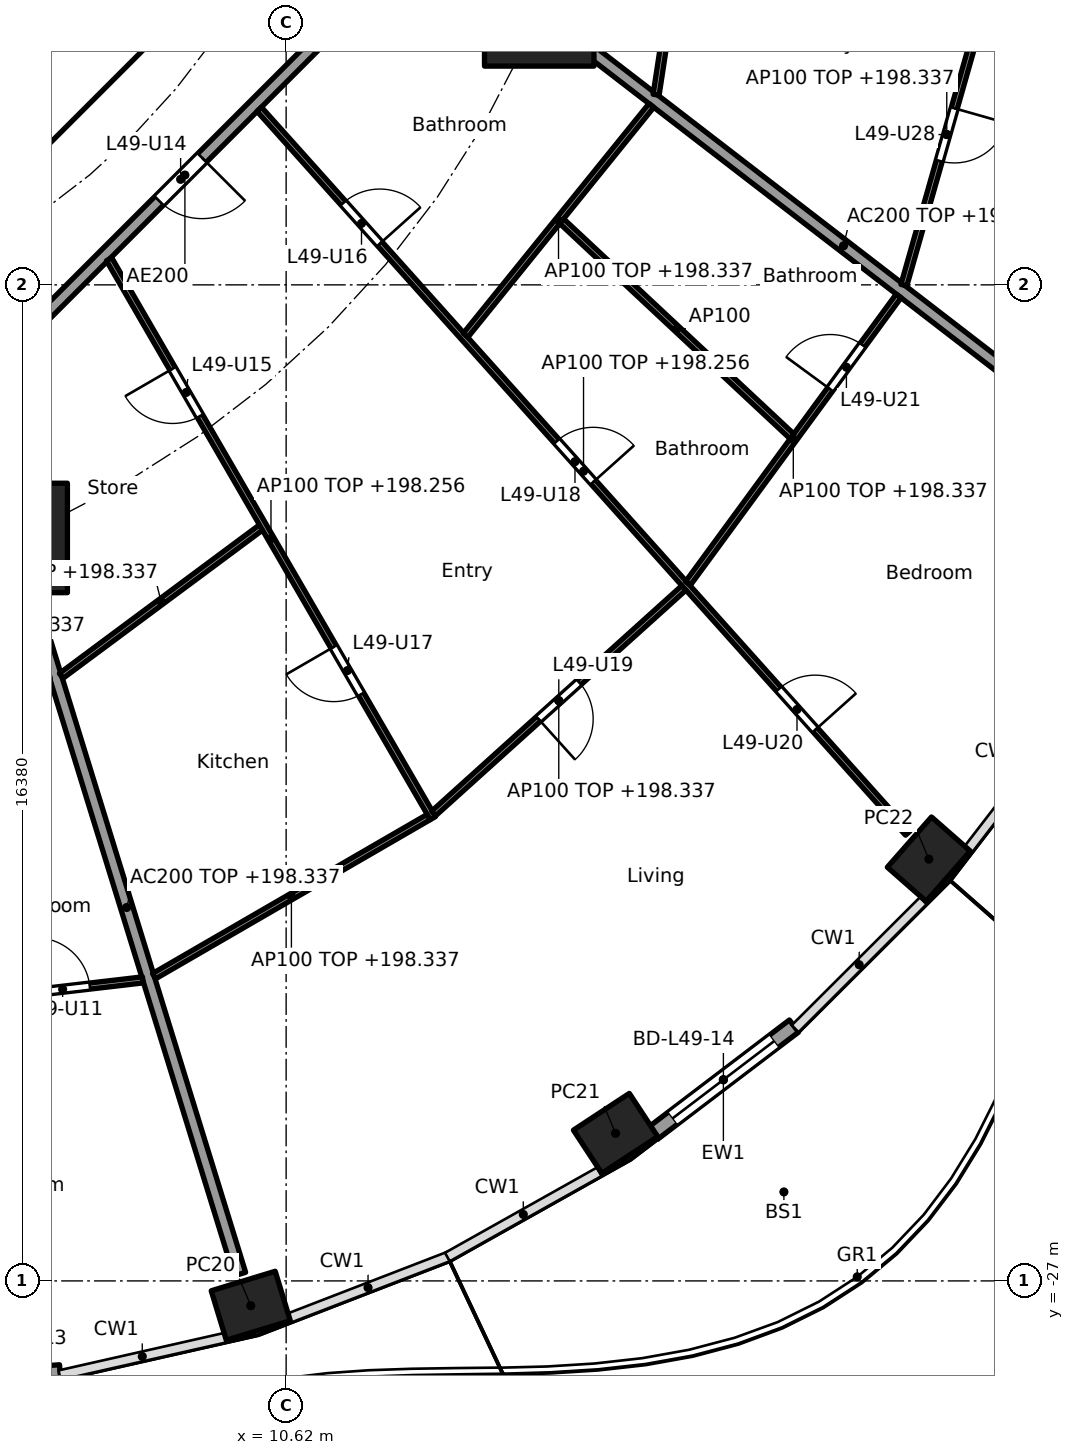
"""IFC4 building model, lengths in metres.
Left out: names, types, materials, properties, quantities, classifications, styles, units other than length and angle.
Written with IfcOpenShell. Run it as: python <this file> out.ifc"""

import sys

from ifc_helpers import new_model, si_unit, direction, frame, frame_2d, origin, origin_2d, place, context, subcontext, project, spatial, rectangle, hollow_rectangle, extrude, element, fill, save


model = new_model("IFC4")
c1 = context("Model", 3, precision=1e-05, world=origin(), true_north=direction((0.0, 1.0)))
c2 = subcontext(c1, "Body", "Model", "MODEL_VIEW")
j1 = project(units=[si_unit("LENGTHUNIT", "METRE"), si_unit("PLANEANGLEUNIT", "RADIAN")], contexts=[c1])
p1 = place(None, origin())
s1 = spatial("IfcSite", under=j1, at=p1, CompositionType="ELEMENT")
p2 = place(p1, origin())
s2 = spatial("IfcBuilding", under=s1, at=p2, CompositionType="ELEMENT")
p3 = place(p2, frame((0.0, 0.0, 195.5)))
s3 = spatial("IfcBuildingStorey", under=s2, at=p3, CompositionType="ELEMENT", Elevation=195.5)
for number, where, z_axis, x_axis in (
    (1, (10.038, -27.408, 0.0), (0.0, 0.0, 1.0), (0.957, 0.292, 0.0)),
    (2, (16.038, -24.573, 0.0), (0.0, 0.0, 1.0), (0.836, 0.549, 0.0)),
    (3, (21.189, -20.064, 0.0), (0.0, 0.0, 1.0), (0.66, 0.751, 0.0)),
):
    element("IfcColumn", number, at=place(p3, frame(where, z_axis=z_axis, x_axis=x_axis)), inside=s3, PredefinedType="COLUMN", context=c2, shape_type="SweptSolid", body=[
        extrude(hollow_rectangle(XDim=1.1, YDim=0.85, WallThickness=0.036, at=origin_2d()), origin(), (0.0, 0.0, 1.0), 3.7),
    ])
for number, where, z_axis, x_axis in (
    (4, (6.123, -14.782, 0.0), (0.0, 0.0, 1.0), (1.0, 0.0, 0.0)),
    (5, (14.782, -6.123, 0.0), (0.0, 0.0, 1.0), (1.0, 0.0, 0.0)),
):
    element("IfcColumn", number, at=place(p3, frame(where, z_axis=z_axis, x_axis=x_axis)), inside=s3, PredefinedType="COLUMN", context=c2, shape_type="SweptSolid", body=[
        extrude(rectangle(XDim=1.8, YDim=1.8, at=origin_2d()), origin(), (0.0, 0.0, 1.0), 3.7),
    ])
p4 = place(p3, frame((6.903, -28.503, 0.0), z_axis=(0.0, 0.0, 1.0), x_axis=(-0.997232064422, -0.074351931305, 0.0)))
e6 = element("IfcWall", 6, at=p4, inside=s3, PredefinedType="SOLIDWALL", context=c2, shape_type="SweptSolid", body=[
    extrude(rectangle(XDim=2.771, YDim=0.25, at=frame_2d((1.386, 0.0))), origin(), (0.0, 0.0, 1.0), 3.44),
])
p5 = place(p4, frame((0.336, 0.0, 0.0)))
e7 = element("IfcOpeningElement", 7, at=p5, cuts=e6, PredefinedType="OPENING", context=c2, shape_type="SweptSolid", body=[
    extrude(rectangle(XDim=2.1, YDim=2.4, at=frame_2d((1.05, 1.2))), frame((0.0, 0.135, 0.0), z_axis=(0.0, -1.0, 0.0), x_axis=(1.0, 0.0, 0.0)), (0.0, 0.0, 1.0), 0.27),
])
p6 = place(p3, frame((18.972, -22.809, 0.0), z_axis=(0.0, 0.0, 1.0), x_axis=(-0.796055733703, -0.60522332146, 0.0)))
e8 = element("IfcWall", 8, at=p6, inside=s3, PredefinedType="SOLIDWALL", context=c2, shape_type="SweptSolid", body=[
    extrude(rectangle(XDim=2.917, YDim=0.25, at=frame_2d((1.458, 0.0))), origin(), (0.0, 0.0, 1.0), 3.44),
])
p7 = place(p6, frame((0.408, 0.0, 0.0)))
e9 = element("IfcOpeningElement", 9, at=p7, cuts=e8, PredefinedType="OPENING", context=c2, shape_type="SweptSolid", body=[
    extrude(rectangle(XDim=2.1, YDim=2.4, at=frame_2d((1.05, 1.2))), frame((0.0, 0.135, 0.0), z_axis=(0.0, -1.0, 0.0), x_axis=(1.0, 0.0, 0.0)), (0.0, 0.0, 1.0), 0.27),
])
p8 = place(p3, frame((4.613, -9.988, 0.0), z_axis=(0.0, 0.0, 1.0), x_axis=(0.707106781187, 0.707106781187, 0.0)))
e10 = element("IfcWall", 10, at=p8, inside=s3, PredefinedType="SHEAR", context=c2, shape_type="SweptSolid", body=[
    extrude(rectangle(XDim=7.602, YDim=0.6, at=frame_2d((3.801, 0.0))), origin(), (0.0, 0.0, 1.0), 3.44),
])
p9 = place(p8, frame((3.201, 0.0, 0.0)))
e11 = element("IfcOpeningElement", 11, at=p9, cuts=e10, PredefinedType="OPENING", context=c2, shape_type="SweptSolid", body=[
    extrude(rectangle(XDim=1.2, YDim=2.1, at=frame_2d((0.6, 1.05))), frame((0.0, 0.31, 0.0), z_axis=(0.0, -1.0, 0.0), x_axis=(1.0, 0.0, 0.0)), (0.0, 0.0, 1.0), 0.62),
])
p10 = place(p3, frame((6.138, -14.83, 0.0), z_axis=(0.0, 0.0, 1.0), x_axis=(0.294818517221, -0.955553264818, 0.0)))
e12 = element("IfcWall", 12, at=p10, inside=s3, PredefinedType="PARTITIONING", context=c2, shape_type="SweptSolid", body=[
    extrude(rectangle(XDim=12.619, YDim=0.2, at=frame_2d((6.31, 0.0))), origin(), (0.0, 0.0, 1.0), 2.837),
])
p11 = place(p3, frame((14.822, -6.154, 0.0), z_axis=(0.0, 0.0, 1.0), x_axis=(0.792203056092, -0.610257583254, 0.0)))
e13 = element("IfcWall", 13, at=p11, inside=s3, PredefinedType="PARTITIONING", context=c2, shape_type="SweptSolid", body=[
    extrude(rectangle(XDim=12.533, YDim=0.2, at=frame_2d((6.266, 0.0))), origin(), (0.0, 0.0, 1.0), 2.837),
])
p12 = place(p3, frame((5.275, -12.494, 0.0), z_axis=(0.0, 0.0, 1.0), x_axis=(0.707106781187, 0.707106781187, 0.0)))
e14 = element("IfcWall", 14, at=p12, inside=s3, PredefinedType="PARTITIONING", context=c2, shape_type="SweptSolid", body=[
    extrude(rectangle(XDim=10.409, YDim=0.2, at=frame_2d((5.205, 0.0))), origin(), (0.0, 0.0, 1.0), 3.44),
])
p13 = place(p12, frame((4.604, 0.0, 0.0)))
e15 = element("IfcOpeningElement", 15, at=p13, cuts=e14, PredefinedType="OPENING", context=c2, shape_type="SweptSolid", body=[
    extrude(rectangle(XDim=1.0, YDim=2.1, at=frame_2d((0.5, 1.05))), frame((0.0, 0.11, 0.0), z_axis=(0.0, -1.0, 0.0), x_axis=(1.0, 0.0, 0.0)), (0.0, 0.0, 1.0), 0.22),
])
p14 = place(p3, frame((2.941, -22.671, 0.0), z_axis=(0.0, 0.0, 1.0), x_axis=(0.993247307754, 0.116016316261, 0.0)))
e16 = element("IfcWall", 16, at=p14, inside=s3, PredefinedType="PARTITIONING", context=c2, shape_type="SweptSolid", body=[
    extrude(rectangle(XDim=5.358, YDim=0.1, at=frame_2d((2.679, 0.0))), origin(), (0.0, 0.0, 1.0), 2.837),
])
p15 = place(p14, frame((3.581, 0.0, 0.0)))
e17 = element("IfcOpeningElement", 17, at=p15, cuts=e16, PredefinedType="OPENING", context=c2, shape_type="SweptSolid", body=[
    extrude(rectangle(XDim=0.9, YDim=2.1, at=frame_2d((0.45, 1.05))), frame((0.0, 0.06, 0.0), z_axis=(0.0, -1.0, 0.0), x_axis=(1.0, 0.0, 0.0)), (0.0, 0.0, 1.0), 0.12),
])
p16 = place(p3, frame((6.921, -17.05, 0.0), z_axis=(0.0, 0.0, 1.0), x_axis=(0.802769141821, 0.596289950394, 0.0)))
e18 = element("IfcWall", 18, at=p16, inside=s3, PredefinedType="PARTITIONING", context=c2, shape_type="SweptSolid", body=[
    extrude(rectangle(XDim=4.092, YDim=0.1, at=frame_2d((2.046, 0.0))), origin(), (0.0, 0.0, 1.0), 2.837),
])
p17 = place(p3, frame((8.448, -21.988, 0.0), z_axis=(0.0, 0.0, 1.0), x_axis=(0.865286427811, 0.501277765163, 0.0)))
e19 = element("IfcWall", 19, at=p17, inside=s3, PredefinedType="PARTITIONING", context=c2, shape_type="SweptSolid", body=[
    extrude(rectangle(XDim=5.22, YDim=0.1, at=frame_2d((2.61, 0.0))), origin(), (0.0, 0.0, 1.0), 2.837),
])
p18 = place(p3, frame((7.708, -10.198, 0.0), z_axis=(0.0, 0.0, 1.0), x_axis=(0.501288100085, -0.865280440501, 0.0)))
e20 = element("IfcWall", 20, at=p18, inside=s3, PredefinedType="PARTITIONING", context=c2, shape_type="SweptSolid", body=[
    extrude(rectangle(XDim=10.623, YDim=0.1, at=frame_2d((5.312, 0.0))), origin(), (0.0, 0.0, 1.0), 2.756),
])
p19 = place(p18, frame((2.082, 0.0, 0.0)))
e21 = element("IfcOpeningElement", 21, at=p19, cuts=e20, PredefinedType="OPENING", context=c2, shape_type="SweptSolid", body=[
    extrude(rectangle(XDim=0.9, YDim=2.1, at=frame_2d((0.45, 1.05))), frame((0.0, 0.06, 0.0), z_axis=(0.0, -1.0, 0.0), x_axis=(1.0, 0.0, 0.0)), (0.0, 0.0, 1.0), 0.12),
])
p20 = place(p18, frame((7.369, 0.0, 0.0)))
e22 = element("IfcOpeningElement", 22, at=p20, cuts=e20, PredefinedType="OPENING", context=c2, shape_type="SweptSolid", body=[
    extrude(rectangle(XDim=0.9, YDim=2.1, at=frame_2d((0.45, 1.05))), frame((0.0, 0.06, 0.0), z_axis=(0.0, -1.0, 0.0), x_axis=(1.0, 0.0, 0.0)), (0.0, 0.0, 1.0), 0.12),
])
p21 = place(p3, frame((13.045, -19.313, 0.0), z_axis=(0.0, 0.0, 1.0), x_axis=(0.742790086539, 0.66952437397, 0.0)))
e23 = element("IfcWall", 23, at=p21, inside=s3, PredefinedType="PARTITIONING", context=c2, shape_type="SweptSolid", body=[
    extrude(rectangle(XDim=5.542, YDim=0.1, at=frame_2d((2.771, 0.0))), origin(), (0.0, 0.0, 1.0), 2.837),
])
p22 = place(p21, frame((2.321, 0.0, 0.0)))
e24 = element("IfcOpeningElement", 24, at=p22, cuts=e23, PredefinedType="OPENING", context=c2, shape_type="SweptSolid", body=[
    extrude(rectangle(XDim=0.9, YDim=2.1, at=frame_2d((0.45, 1.05))), frame((0.0, 0.06, 0.0), z_axis=(0.0, -1.0, 0.0), x_axis=(1.0, 0.0, 0.0)), (0.0, 0.0, 1.0), 0.12),
])
p23 = place(p3, frame((10.178, -7.732, 0.0), z_axis=(0.0, 0.0, 1.0), x_axis=(0.667283629999, -0.74480370376, 0.0)))
e25 = element("IfcWall", 25, at=p23, inside=s3, PredefinedType="PARTITIONING", context=c2, shape_type="SweptSolid", body=[
    extrude(rectangle(XDim=15.983, YDim=0.1, at=frame_2d((7.992, 0.0))), origin(), (0.0, 0.0, 1.0), 2.756),
])
p24 = place(p23, frame((2.07, 0.0, 0.0)))
e26 = element("IfcOpeningElement", 26, at=p24, cuts=e25, PredefinedType="OPENING", context=c2, shape_type="SweptSolid", body=[
    extrude(rectangle(XDim=0.9, YDim=2.1, at=frame_2d((0.45, 1.05))), frame((0.0, 0.06, 0.0), z_axis=(0.0, -1.0, 0.0), x_axis=(1.0, 0.0, 0.0)), (0.0, 0.0, 1.0), 0.12),
])
p25 = place(p23, frame((7.331, 0.0, 0.0)))
e27 = element("IfcOpeningElement", 27, at=p25, cuts=e25, PredefinedType="OPENING", context=c2, shape_type="SweptSolid", body=[
    extrude(rectangle(XDim=0.9, YDim=2.1, at=frame_2d((0.45, 1.05))), frame((0.0, 0.06, 0.0), z_axis=(0.0, -1.0, 0.0), x_axis=(1.0, 0.0, 0.0)), (0.0, 0.0, 1.0), 0.12),
])
p26 = place(p23, frame((12.802, 0.0, 0.0)))
e28 = element("IfcOpeningElement", 28, at=p26, cuts=e25, PredefinedType="OPENING", context=c2, shape_type="SweptSolid", body=[
    extrude(rectangle(XDim=0.9, YDim=2.1, at=frame_2d((0.45, 1.05))), frame((0.0, 0.06, 0.0), z_axis=(0.0, -1.0, 0.0), x_axis=(1.0, 0.0, 0.0)), (0.0, 0.0, 1.0), 0.12),
])
p27 = place(p3, frame((13.572, -11.447, 0.0), z_axis=(0.0, 0.0, 1.0), x_axis=(0.628738316533, 0.777616955399, 0.0)))
e29 = element("IfcWall", 29, at=p27, inside=s3, PredefinedType="PARTITIONING", context=c2, shape_type="SweptSolid", body=[
    extrude(rectangle(XDim=4.857, YDim=0.1, at=frame_2d((2.429, 0.0))), origin(), (0.0, 0.0, 1.0), 2.837),
])
p28 = place(p3, frame((17.229, -15.529, 0.0), z_axis=(0.0, 0.0, 1.0), x_axis=(0.591110768293, 0.806590391468, 0.0)))
e30 = element("IfcWall", 30, at=p28, inside=s3, PredefinedType="PARTITIONING", context=c2, shape_type="SweptSolid", body=[
    extrude(rectangle(XDim=5.86, YDim=0.1, at=frame_2d((2.93, 0.0))), origin(), (0.0, 0.0, 1.0), 2.837),
])
p29 = place(p28, frame((3.958, 0.0, 0.0)))
e31 = element("IfcOpeningElement", 31, at=p29, cuts=e30, PredefinedType="OPENING", context=c2, shape_type="SweptSolid", body=[
    extrude(rectangle(XDim=0.9, YDim=2.1, at=frame_2d((0.45, 1.05))), frame((0.0, 0.06, 0.0), z_axis=(0.0, -1.0, 0.0), x_axis=(1.0, 0.0, 0.0)), (0.0, 0.0, 1.0), 0.12),
])
p30 = place(p3, frame((15.152, -9.573, 0.0), z_axis=(0.0, 0.0, 1.0), x_axis=(0.730723083214, -0.682673989294, 0.0)))
e32 = element("IfcWall", 32, at=p30, inside=s3, PredefinedType="PARTITIONING", context=c2, shape_type="SweptSolid", body=[
    extrude(rectangle(XDim=5.183, YDim=0.1, at=frame_2d((2.591, 0.0))), origin(), (0.0, 0.0, 1.0), 3.44),
])
p31 = place(p3, frame((16.704, -7.493, 0.0), z_axis=(0.0, 0.0, 1.0), x_axis=(0.1510806336, 0.988521442434, 0.0)))
e33 = element("IfcWall", 33, at=p31, inside=s3, PredefinedType="PARTITIONING", context=c2, shape_type="SweptSolid", body=[
    extrude(rectangle(XDim=3.419, YDim=0.1, at=frame_2d((1.71, 0.0))), origin(), (0.0, 0.0, 1.0), 2.837),
])
p32 = place(p31, frame((2.339, 0.0, 0.0)))
e34 = element("IfcOpeningElement", 34, at=p32, cuts=e33, PredefinedType="OPENING", context=c2, shape_type="SweptSolid", body=[
    extrude(rectangle(XDim=0.9, YDim=2.1, at=frame_2d((0.45, 1.05))), frame((0.0, 0.06, 0.0), z_axis=(0.0, -1.0, 0.0), x_axis=(1.0, 0.0, 0.0)), (0.0, 0.0, 1.0), 0.12),
])
p33 = place(p3, frame((20.779, -10.625, 0.0), z_axis=(0.0, 0.0, 1.0), x_axis=(0.273819702124, 0.961781040949, 0.0)))
e35 = element("IfcWall", 35, at=p33, inside=s3, PredefinedType="PARTITIONING", context=c2, shape_type="SweptSolid", body=[
    extrude(rectangle(XDim=5.152, YDim=0.1, at=frame_2d((2.576, 0.0))), origin(), (0.0, 0.0, 1.0), 2.837),
])
p34 = place(p33, frame((2.126, 0.0, 0.0)))
e36 = element("IfcOpeningElement", 36, at=p34, cuts=e35, PredefinedType="OPENING", context=c2, shape_type="SweptSolid", body=[
    extrude(rectangle(XDim=0.9, YDim=2.1, at=frame_2d((0.45, 1.05))), frame((0.0, 0.06, 0.0), z_axis=(0.0, -1.0, 0.0), x_axis=(1.0, 0.0, 0.0)), (0.0, 0.0, 1.0), 0.12),
])
p35 = place(p7, origin())
e37 = element("IfcDoor", 37, at=p35, inside=s3, OperationType="SLIDING_TO_LEFT", PredefinedType="DOOR", context=c2, shape_type="SweptSolid", body=[
    extrude(rectangle(XDim=2.1, YDim=2.4, at=frame_2d((1.05, 1.2))), frame((0.0, 0.025, 0.0), z_axis=(0.0, -1.0, 0.0), x_axis=(1.0, 0.0, 0.0)), (0.0, 0.0, 1.0), 0.05),
])
fill(e9, e37)
p36 = place(p9, origin())
e38 = element("IfcDoor", 38, at=p36, inside=s3, OperationType="SINGLE_SWING_RIGHT", PredefinedType="DOOR", context=c2, shape_type="SweptSolid", body=[
    extrude(rectangle(XDim=1.2, YDim=2.1, at=frame_2d((0.6, 1.05))), frame((0.0, 0.025, 0.0), z_axis=(0.0, -1.0, 0.0), x_axis=(1.0, 0.0, 0.0)), (0.0, 0.0, 1.0), 0.05),
])
fill(e11, e38)
p37 = place(p15, origin())
e39 = element("IfcDoor", 39, at=p37, inside=s3, OperationType="SINGLE_SWING_LEFT", PredefinedType="DOOR", context=c2, shape_type="SweptSolid", body=[
    extrude(rectangle(XDim=0.9, YDim=2.1, at=frame_2d((0.45, 1.05))), frame((0.0, 0.025, 0.0), z_axis=(0.0, -1.0, 0.0), x_axis=(1.0, 0.0, 0.0)), (0.0, 0.0, 1.0), 0.05),
])
fill(e17, e39)
p38 = place(p13, frame((1.0, 0.0, 0.0), x_axis=(-1.0, 0.0, 0.0)))
e40 = element("IfcDoor", 40, at=p38, inside=s3, OperationType="SINGLE_SWING_LEFT", PredefinedType="DOOR", context=c2, shape_type="SweptSolid", body=[
    extrude(rectangle(XDim=1.0, YDim=2.1, at=frame_2d((0.5, 1.05))), frame((0.0, 0.025, 0.0), z_axis=(0.0, -1.0, 0.0), x_axis=(1.0, 0.0, 0.0)), (0.0, 0.0, 1.0), 0.05),
])
fill(e15, e40)
p39 = place(p19, frame((0.9, 0.0, 0.0), x_axis=(-1.0, 0.0, 0.0)))
e41 = element("IfcDoor", 41, at=p39, inside=s3, OperationType="SINGLE_SWING_RIGHT", PredefinedType="DOOR", context=c2, shape_type="SweptSolid", body=[
    extrude(rectangle(XDim=0.9, YDim=2.1, at=frame_2d((0.45, 1.05))), frame((0.0, 0.025, 0.0), z_axis=(0.0, -1.0, 0.0), x_axis=(1.0, 0.0, 0.0)), (0.0, 0.0, 1.0), 0.05),
])
fill(e21, e41)
p40 = place(p24, origin())
e42 = element("IfcDoor", 42, at=p40, inside=s3, OperationType="SINGLE_SWING_RIGHT", PredefinedType="DOOR", context=c2, shape_type="SweptSolid", body=[
    extrude(rectangle(XDim=0.9, YDim=2.1, at=frame_2d((0.45, 1.05))), frame((0.0, 0.025, 0.0), z_axis=(0.0, -1.0, 0.0), x_axis=(1.0, 0.0, 0.0)), (0.0, 0.0, 1.0), 0.05),
])
fill(e26, e42)
p41 = place(p20, frame((0.9, 0.0, 0.0), x_axis=(-1.0, 0.0, 0.0)))
e43 = element("IfcDoor", 43, at=p41, inside=s3, OperationType="SINGLE_SWING_RIGHT", PredefinedType="DOOR", context=c2, shape_type="SweptSolid", body=[
    extrude(rectangle(XDim=0.9, YDim=2.1, at=frame_2d((0.45, 1.05))), frame((0.0, 0.025, 0.0), z_axis=(0.0, -1.0, 0.0), x_axis=(1.0, 0.0, 0.0)), (0.0, 0.0, 1.0), 0.05),
])
fill(e22, e43)
p42 = place(p25, origin())
e44 = element("IfcDoor", 44, at=p42, inside=s3, OperationType="SINGLE_SWING_RIGHT", PredefinedType="DOOR", context=c2, shape_type="SweptSolid", body=[
    extrude(rectangle(XDim=0.9, YDim=2.1, at=frame_2d((0.45, 1.05))), frame((0.0, 0.025, 0.0), z_axis=(0.0, -1.0, 0.0), x_axis=(1.0, 0.0, 0.0)), (0.0, 0.0, 1.0), 0.05),
])
fill(e27, e44)
p43 = place(p22, frame((0.9, 0.0, 0.0), x_axis=(-1.0, 0.0, 0.0)))
e45 = element("IfcDoor", 45, at=p43, inside=s3, OperationType="SINGLE_SWING_RIGHT", PredefinedType="DOOR", context=c2, shape_type="SweptSolid", body=[
    extrude(rectangle(XDim=0.9, YDim=2.1, at=frame_2d((0.45, 1.05))), frame((0.0, 0.025, 0.0), z_axis=(0.0, -1.0, 0.0), x_axis=(1.0, 0.0, 0.0)), (0.0, 0.0, 1.0), 0.05),
])
fill(e24, e45)
p44 = place(p26, origin())
e46 = element("IfcDoor", 46, at=p44, inside=s3, OperationType="SINGLE_SWING_RIGHT", PredefinedType="DOOR", context=c2, shape_type="SweptSolid", body=[
    extrude(rectangle(XDim=0.9, YDim=2.1, at=frame_2d((0.45, 1.05))), frame((0.0, 0.025, 0.0), z_axis=(0.0, -1.0, 0.0), x_axis=(1.0, 0.0, 0.0)), (0.0, 0.0, 1.0), 0.05),
])
fill(e28, e46)
p45 = place(p29, origin())
e47 = element("IfcDoor", 47, at=p45, inside=s3, OperationType="SINGLE_SWING_LEFT", PredefinedType="DOOR", context=c2, shape_type="SweptSolid", body=[
    extrude(rectangle(XDim=0.9, YDim=2.1, at=frame_2d((0.45, 1.05))), frame((0.0, 0.025, 0.0), z_axis=(0.0, -1.0, 0.0), x_axis=(1.0, 0.0, 0.0)), (0.0, 0.0, 1.0), 0.05),
])
fill(e31, e47)
p46 = place(p34, frame((0.9, 0.0, 0.0), x_axis=(-1.0, 0.0, 0.0)))
e48 = element("IfcDoor", 48, at=p46, inside=s3, OperationType="SINGLE_SWING_LEFT", PredefinedType="DOOR", context=c2, shape_type="SweptSolid", body=[
    extrude(rectangle(XDim=0.9, YDim=2.1, at=frame_2d((0.45, 1.05))), frame((0.0, 0.025, 0.0), z_axis=(0.0, -1.0, 0.0), x_axis=(1.0, 0.0, 0.0)), (0.0, 0.0, 1.0), 0.05),
])
fill(e36, e48)
save(model, sys.argv[1])
